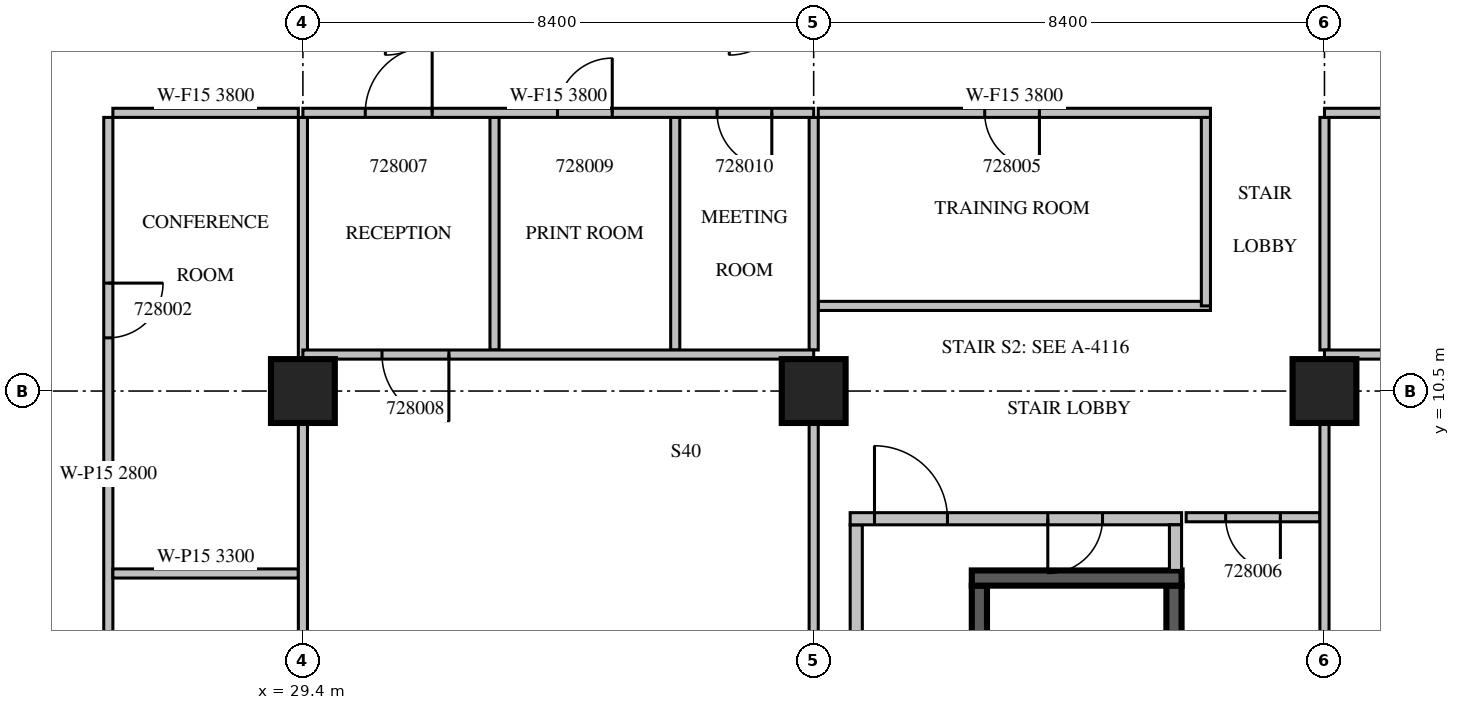
"""IFC4 building model, lengths in metres.
Left out: names, types, materials, properties, quantities, classifications, styles, units other than length and angle.
Written with IfcOpenShell. Run it as: python <this file> out.ifc"""

import sys

from ifc_helpers import new_model, si_unit, direction, frame, frame_2d, origin, origin_2d, place, context, subcontext, project, spatial, rectangle, extrude, source, transform, mapped, element, fill, save


model = new_model("IFC4")
c1 = context("Model", 3, precision=1e-05, world=origin(), true_north=direction((0.0, 1.0)))
c2 = subcontext(c1, "Body", "Model", "MODEL_VIEW")
j1 = project(units=[si_unit("LENGTHUNIT", "METRE"), si_unit("PLANEANGLEUNIT", "RADIAN")], contexts=[c1])
p1 = place(None, origin())
s1 = spatial("IfcSite", under=j1, at=p1, CompositionType="ELEMENT")
p2 = place(p1, origin())
s2 = spatial("IfcBuilding", under=s1, at=p2, CompositionType="ELEMENT")
p3 = place(p2, frame((0.0, 0.0, 128.7)))
s3 = spatial("IfcBuildingStorey", under=s2, at=p3, CompositionType="ELEMENT", Elevation=128.7)
m1 = source(origin(), c2, "Body", "SweptSolid", [
    extrude(rectangle(XDim=1.05, YDim=1.05, at=origin_2d()), origin(), (0.0, 0.0, 1.0), 4.2),
])
for number, where, z_axis, x_axis in (
    (1, (29.4, 10.5, 0.0), (0.0, 0.0, 1.0), (1.0, 0.0, 0.0)),
    (2, (37.8, 10.5, 0.0), (0.0, 0.0, 1.0), (1.0, 0.0, 0.0)),
    (3, (46.2, 10.5, 0.0), (0.0, 0.0, 1.0), (1.0, 0.0, 0.0)),
):
    element("IfcColumn", number, at=place(p3, frame(where, z_axis=z_axis, x_axis=x_axis)), inside=s3, PredefinedType="COLUMN", context=c2, shape_type="MappedRepresentation", body=[
        mapped(m1, transform((0.0, 0.0, 0.0), scale=1.0)),
    ])
m2 = source(origin(), c2, "Body", "SweptSolid", [
    extrude(rectangle(XDim=7.0, YDim=0.25, at=frame_2d((3.5, 0.0))), origin(), (0.0, 0.0, 1.0), 3.8),
])
p4 = place(p3, frame((40.525, 0.3, 0.0), z_axis=(0.0, 0.0, 1.0), x_axis=(0.0, 1.0, 0.0)))
e4 = element("IfcWall", 4, at=p4, inside=s3, PredefinedType="SOLIDWALL", context=c2, shape_type="MappedRepresentation", body=[
    mapped(m2, transform((0.0, 0.0, 0.0), scale=1.0)),
])
m3 = source(origin(), c2, "Body", "SweptSolid", [
    extrude(rectangle(XDim=1.1, YDim=2.1, at=frame_2d((0.55, 1.05))), frame((0.0, 0.135, 0.0), z_axis=(0.0, -1.0, 0.0), x_axis=(1.0, 0.0, 0.0)), (0.0, 0.0, 1.0), 0.27),
])
p5 = place(p4, frame((0.55, 0.0, 0.0)))
e5 = element("IfcOpeningElement", 5, at=p5, cuts=e4, PredefinedType="OPENING", context=c2, shape_type="MappedRepresentation", body=[
    mapped(m3, transform((0.0, 0.0, 0.0), scale=1.0)),
])
p6 = place(p3, frame((43.725, 0.3, 0.0), z_axis=(0.0, 0.0, 1.0), x_axis=(0.0, 1.0, 0.0)))
e6 = element("IfcWall", 6, at=p6, inside=s3, PredefinedType="SOLIDWALL", context=c2, shape_type="MappedRepresentation", body=[
    mapped(m2, transform((0.0, 0.0, 0.0), scale=1.0)),
])
m4 = source(origin(), c2, "Body", "SweptSolid", [
    extrude(rectangle(XDim=3.45, YDim=0.25, at=frame_2d((1.725, 0.0))), origin(), (0.0, 0.0, 1.0), 3.8),
])
p7 = place(p3, frame((40.4, 7.425, 0.0), z_axis=(0.0, 0.0, 1.0), x_axis=(1.0, 0.0, 0.0)))
e7 = element("IfcWall", 7, at=p7, inside=s3, PredefinedType="SOLIDWALL", context=c2, shape_type="MappedRepresentation", body=[
    mapped(m4, transform((0.0, 0.0, 0.0), scale=1.0)),
])
m5 = source(origin(), c2, "Body", "SweptSolid", [
    extrude(rectangle(XDim=8.0, YDim=0.2, at=frame_2d((4.0, 0.0))), origin(), (0.0, 0.0, 1.0), 3.8),
])
p8 = place(p3, frame((38.5, 0.3, 0.0), z_axis=(0.0, 0.0, 1.0), x_axis=(0.0, 1.0, 0.0)))
e8 = element("IfcWall", 8, at=p8, inside=s3, PredefinedType="PARTITIONING", context=c2, shape_type="MappedRepresentation", body=[
    mapped(m5, transform((0.0, 0.0, 0.0), scale=1.0)),
])
m6 = source(origin(), c2, "Body", "SweptSolid", [
    extrude(rectangle(XDim=5.45, YDim=0.2, at=frame_2d((2.725, 0.0))), origin(), (0.0, 0.0, 1.0), 3.8),
])
p9 = place(p3, frame((38.4, 8.4, 0.0), z_axis=(0.0, 0.0, 1.0), x_axis=(1.0, 0.0, 0.0)))
e9 = element("IfcWall", 9, at=p9, inside=s3, PredefinedType="PARTITIONING", context=c2, shape_type="MappedRepresentation", body=[
    mapped(m6, transform((0.0, 0.0, 0.0), scale=1.0)),
])
m7 = source(origin(), c2, "Body", "SweptSolid", [
    extrude(rectangle(XDim=1.2, YDim=2.1, at=frame_2d((0.6, 1.05))), frame((0.0, 0.11, 0.0), z_axis=(0.0, -1.0, 0.0), x_axis=(1.0, 0.0, 0.0)), (0.0, 0.0, 1.0), 0.22),
])
p10 = place(p9, frame((0.4, 0.0, 0.0)))
e10 = element("IfcOpeningElement", 10, at=p10, cuts=e9, PredefinedType="OPENING", context=c2, shape_type="MappedRepresentation", body=[
    mapped(m7, transform((0.0, 0.0, 0.0), scale=1.0)),
])
m8 = source(origin(), c2, "Body", "SweptSolid", [
    extrude(rectangle(XDim=0.9, YDim=2.1, at=frame_2d((0.45, 1.05))), frame((0.0, 0.11, 0.0), z_axis=(0.0, -1.0, 0.0), x_axis=(1.0, 0.0, 0.0)), (0.0, 0.0, 1.0), 0.22),
])
p11 = place(p9, frame((3.25, 0.0, 0.0)))
e11 = element("IfcOpeningElement", 11, at=p11, cuts=e9, PredefinedType="OPENING", context=c2, shape_type="MappedRepresentation", body=[
    mapped(m8, transform((0.0, 0.0, 0.0), scale=1.0)),
])
m9 = source(origin(), c2, "Body", "SweptSolid", [
    extrude(rectangle(XDim=0.75, YDim=0.2, at=frame_2d((0.375, 0.0))), origin(), (0.0, 0.0, 1.0), 3.8),
])
p12 = place(p3, frame((43.75, 7.55, 0.0), z_axis=(0.0, 0.0, 1.0), x_axis=(0.0, 1.0, 0.0)))
e12 = element("IfcWall", 12, at=p12, inside=s3, PredefinedType="PARTITIONING", context=c2, shape_type="MappedRepresentation", body=[
    mapped(m9, transform((0.0, 0.0, 0.0), scale=1.0)),
])
p13 = place(p3, frame((26.2, 15.0, 0.0), z_axis=(0.0, 0.0, 1.0), x_axis=(0.0, -1.0, 0.0)))
e13 = element("IfcWall", 13, at=p13, inside=s3, PredefinedType="PARTITIONING", context=c2, shape_type="SweptSolid", body=[
    extrude(rectangle(XDim=11.725, YDim=0.15, at=frame_2d((5.862, 0.0))), origin(), (0.0, 0.0, 1.0), 2.8),
])
m10 = source(origin(), c2, "Body", "SweptSolid", [
    extrude(rectangle(XDim=0.9, YDim=2.1, at=frame_2d((0.45, 1.05))), frame((0.0, 0.085, 0.0), z_axis=(0.0, -1.0, 0.0), x_axis=(1.0, 0.0, 0.0)), (0.0, 0.0, 1.0), 0.17),
])
p14 = place(p13, frame((9.463, 0.0, 0.0)))
e14 = element("IfcOpeningElement", 14, at=p14, cuts=e13, PredefinedType="OPENING", context=c2, shape_type="MappedRepresentation", body=[
    mapped(m10, transform((0.0, 0.0, 0.0), scale=1.0)),
])
p15 = place(p13, frame((2.725, 0.0, 0.0)))
e15 = element("IfcOpeningElement", 15, at=p15, cuts=e13, PredefinedType="OPENING", context=c2, shape_type="MappedRepresentation", body=[
    mapped(m10, transform((0.0, 0.0, 0.0), scale=1.0)),
])
p16 = place(p3, frame((29.325, 7.5, 0.0), z_axis=(0.0, 0.0, 1.0), x_axis=(-1.0, 0.0, 0.0)))
e16 = element("IfcWall", 16, at=p16, inside=s3, PredefinedType="PARTITIONING", context=c2, shape_type="SweptSolid", body=[
    extrude(rectangle(XDim=3.05, YDim=0.15, at=frame_2d((1.525, 0.0))), origin(), (0.0, 0.0, 1.0), 3.3),
])
m11 = source(origin(), c2, "Body", "SweptSolid", [
    extrude(rectangle(XDim=3.05, YDim=0.15, at=frame_2d((1.525, 0.0))), origin(), (0.0, 0.0, 1.0), 3.8),
])
p17 = place(p3, frame((29.325, 15.075, 0.0), z_axis=(0.0, 0.0, 1.0), x_axis=(-1.0, 0.0, 0.0)))
e17 = element("IfcWall", 17, at=p17, inside=s3, PredefinedType="PARTITIONING", context=c2, shape_type="MappedRepresentation", body=[
    mapped(m11, transform((0.0, 0.0, 0.0), scale=1.0)),
])
m12 = source(origin(), c2, "Body", "SweptSolid", [
    extrude(rectangle(XDim=6.701, YDim=0.15, at=frame_2d((3.35, 0.0))), origin(), (0.0, 0.0, 1.0), 3.8),
])
p18 = place(p3, frame((29.4, 3.275, 0.0), z_axis=(0.0, 0.0, 1.0), x_axis=(0.0, 1.0, 0.0)))
e18 = element("IfcWall", 18, at=p18, inside=s3, PredefinedType="PARTITIONING", context=c2, shape_type="MappedRepresentation", body=[
    mapped(m12, transform((0.0, 0.0, 0.0), scale=1.0)),
])
m13 = source(origin(), c2, "Body", "SweptSolid", [
    extrude(rectangle(XDim=3.976, YDim=0.15, at=frame_2d((1.988, 0.0))), origin(), (0.0, 0.0, 1.0), 3.8),
])
p19 = place(p3, frame((29.4, 11.024, 0.0), z_axis=(0.0, 0.0, 1.0), x_axis=(0.0, 1.0, 0.0)))
e19 = element("IfcWall", 19, at=p19, inside=s3, PredefinedType="PARTITIONING", context=c2, shape_type="MappedRepresentation", body=[
    mapped(m13, transform((0.0, 0.0, 0.0), scale=1.0)),
])
m14 = source(origin(), c2, "Body", "SweptSolid", [
    extrude(rectangle(XDim=6.45, YDim=0.15, at=frame_2d((3.225, 0.0))), origin(), (0.0, 0.0, 1.0), 3.8),
])
p20 = place(p3, frame((37.875, 11.9, 0.0), z_axis=(0.0, 0.0, 1.0), x_axis=(1.0, 0.0, 0.0)))
e20 = element("IfcWall", 20, at=p20, inside=s3, PredefinedType="PARTITIONING", context=c2, shape_type="MappedRepresentation", body=[
    mapped(m14, transform((0.0, 0.0, 0.0), scale=1.0)),
])
m15 = source(origin(), c2, "Body", "SweptSolid", [
    extrude(rectangle(XDim=3.175, YDim=0.15, at=frame_2d((1.587, 0.0))), origin(), (0.0, 0.0, 1.0), 3.8),
])
p21 = place(p3, frame((44.25, 11.9, 0.0), z_axis=(0.0, 0.0, 1.0), x_axis=(0.0, 1.0, 0.0)))
e21 = element("IfcWall", 21, at=p21, inside=s3, PredefinedType="PARTITIONING", context=c2, shape_type="MappedRepresentation", body=[
    mapped(m15, transform((0.0, 0.0, 0.0), scale=1.0)),
])
p22 = place(p3, frame((44.325, 15.075, 0.0), z_axis=(0.0, 0.0, 1.0), x_axis=(-1.0, 0.0, 0.0)))
e22 = element("IfcWall", 22, at=p22, inside=s3, PredefinedType="PARTITIONING", context=c2, shape_type="MappedRepresentation", body=[
    mapped(m14, transform((0.0, 0.0, 0.0), scale=1.0)),
])
p23 = place(p22, frame((2.812, 0.0, 0.0)))
e23 = element("IfcOpeningElement", 23, at=p23, cuts=e22, PredefinedType="OPENING", context=c2, shape_type="MappedRepresentation", body=[
    mapped(m10, transform((0.0, 0.0, 0.0), scale=1.0)),
])
m16 = source(origin(), c2, "Body", "SweptSolid", [
    extrude(rectangle(XDim=2.2, YDim=0.15, at=frame_2d((1.1, 0.0))), origin(), (0.0, 0.0, 1.0), 3.8),
])
p24 = place(p3, frame((46.125, 8.425, 0.0), z_axis=(0.0, 0.0, 1.0), x_axis=(-1.0, 0.0, 0.0)))
e24 = element("IfcWall", 24, at=p24, inside=s3, PredefinedType="PARTITIONING", context=c2, shape_type="MappedRepresentation", body=[
    mapped(m16, transform((0.0, 0.0, 0.0), scale=1.0)),
])
p25 = place(p24, frame((0.65, 0.0, 0.0)))
e25 = element("IfcOpeningElement", 25, at=p25, cuts=e24, PredefinedType="OPENING", context=c2, shape_type="MappedRepresentation", body=[
    mapped(m10, transform((0.0, 0.0, 0.0), scale=1.0)),
])
m17 = source(origin(), c2, "Body", "SweptSolid", [
    extrude(rectangle(XDim=3.825, YDim=0.15, at=frame_2d((1.913, 0.0))), origin(), (0.0, 0.0, 1.0), 3.8),
])
for number, where, z_axis, x_axis in (
    (26, (32.551, 11.175, 0.0), (0.0, 0.0, 1.0), (0.0, 1.0, 0.0)),
    (27, (35.523, 11.175, 0.0), (0.0, 0.0, 1.0), (0.0, 1.0, 0.0)),
):
    element("IfcWall", number, at=place(p3, frame(where, z_axis=z_axis, x_axis=x_axis)), inside=s3, PredefinedType="PARTITIONING", context=c2, shape_type="MappedRepresentation", body=[
        mapped(m17, transform((0.0, 0.0, 0.0), scale=1.0)),
    ])
m18 = source(origin(), c2, "Body", "SweptSolid", [
    extrude(rectangle(XDim=8.927, YDim=0.15, at=frame_2d((4.463, 0.0))), origin(), (0.0, 0.0, 1.0), 3.8),
])
p26 = place(p3, frame((37.8, 1.049, 0.0), z_axis=(0.0, 0.0, 1.0), x_axis=(0.0, 1.0, 0.0)))
e28 = element("IfcWall", 28, at=p26, inside=s3, PredefinedType="PARTITIONING", context=c2, shape_type="MappedRepresentation", body=[
    mapped(m18, transform((0.0, 0.0, 0.0), scale=1.0)),
])
p27 = place(p3, frame((37.8, 11.175, 0.0), z_axis=(0.0, 0.0, 1.0), x_axis=(0.0, 1.0, 0.0)))
e29 = element("IfcWall", 29, at=p27, inside=s3, PredefinedType="PARTITIONING", context=c2, shape_type="MappedRepresentation", body=[
    mapped(m17, transform((0.0, 0.0, 0.0), scale=1.0)),
])
m19 = source(origin(), c2, "Body", "SweptSolid", [
    extrude(rectangle(XDim=8.4, YDim=0.15, at=frame_2d((4.2, 0.0))), origin(), (0.0, 0.0, 1.0), 3.8),
])
p28 = place(p3, frame((37.8, 11.1, 0.0), z_axis=(0.0, 0.0, 1.0), x_axis=(-1.0, 0.0, 0.0)))
e30 = element("IfcWall", 30, at=p28, inside=s3, PredefinedType="PARTITIONING", context=c2, shape_type="MappedRepresentation", body=[
    mapped(m19, transform((0.0, 0.0, 0.0), scale=1.0)),
])
m20 = source(origin(), c2, "Body", "SweptSolid", [
    extrude(rectangle(XDim=1.1, YDim=2.1, at=frame_2d((0.55, 1.05))), frame((0.0, 0.085, 0.0), z_axis=(0.0, -1.0, 0.0), x_axis=(1.0, 0.0, 0.0)), (0.0, 0.0, 1.0), 0.17),
])
p29 = place(p28, frame((5.999, 0.0, 0.0)))
e31 = element("IfcOpeningElement", 31, at=p29, cuts=e30, PredefinedType="OPENING", context=c2, shape_type="MappedRepresentation", body=[
    mapped(m20, transform((0.0, 0.0, 0.0), scale=1.0)),
])
p30 = place(p3, frame((46.2, 1.049, 0.0), z_axis=(0.0, 0.0, 1.0), x_axis=(0.0, 1.0, 0.0)))
e32 = element("IfcWall", 32, at=p30, inside=s3, PredefinedType="PARTITIONING", context=c2, shape_type="MappedRepresentation", body=[
    mapped(m18, transform((0.0, 0.0, 0.0), scale=1.0)),
])
p31 = place(p3, frame((46.2, 11.175, 0.0), z_axis=(0.0, 0.0, 1.0), x_axis=(0.0, 1.0, 0.0)))
e33 = element("IfcWall", 33, at=p31, inside=s3, PredefinedType="PARTITIONING", context=c2, shape_type="MappedRepresentation", body=[
    mapped(m17, transform((0.0, 0.0, 0.0), scale=1.0)),
])
m21 = source(origin(), c2, "Body", "SweptSolid", [
    extrude(rectangle(XDim=24.9, YDim=0.15, at=frame_2d((12.45, 0.0))), origin(), (0.0, 0.0, 1.0), 3.8),
])
p32 = place(p3, frame((71.1, 11.1, 0.0), z_axis=(0.0, 0.0, 1.0), x_axis=(-1.0, 0.0, 0.0)))
e34 = element("IfcWall", 34, at=p32, inside=s3, PredefinedType="PARTITIONING", context=c2, shape_type="MappedRepresentation", body=[
    mapped(m21, transform((0.0, 0.0, 0.0), scale=1.0)),
])
p33 = place(p32, frame((21.51, 0.0, 0.0)))
e35 = element("IfcOpeningElement", 35, at=p33, cuts=e34, PredefinedType="OPENING", context=c2, shape_type="MappedRepresentation", body=[
    mapped(m10, transform((0.0, 0.0, 0.0), scale=1.0)),
])
p34 = place(p32, frame((15.63, 0.0, 0.0)))
e36 = element("IfcOpeningElement", 36, at=p34, cuts=e34, PredefinedType="OPENING", context=c2, shape_type="MappedRepresentation", body=[
    mapped(m10, transform((0.0, 0.0, 0.0), scale=1.0)),
])
p35 = place(p32, frame((9.75, 0.0, 0.0)))
e37 = element("IfcOpeningElement", 37, at=p35, cuts=e34, PredefinedType="OPENING", context=c2, shape_type="MappedRepresentation", body=[
    mapped(m10, transform((0.0, 0.0, 0.0), scale=1.0)),
])
p36 = place(p32, frame((4.645, 0.0, 0.0)))
e38 = element("IfcOpeningElement", 38, at=p36, cuts=e34, PredefinedType="OPENING", context=c2, shape_type="MappedRepresentation", body=[
    mapped(m10, transform((0.0, 0.0, 0.0), scale=1.0)),
])
p37 = place(p32, frame((2.105, 0.0, 0.0)))
e39 = element("IfcOpeningElement", 39, at=p37, cuts=e34, PredefinedType="OPENING", context=c2, shape_type="MappedRepresentation", body=[
    mapped(m20, transform((0.0, 0.0, 0.0), scale=1.0)),
])
p38 = place(p3, frame((37.8, 15.075, 0.0), z_axis=(0.0, 0.0, 1.0), x_axis=(-1.0, 0.0, 0.0)))
e40 = element("IfcWall", 40, at=p38, inside=s3, PredefinedType="PARTITIONING", context=c2, shape_type="MappedRepresentation", body=[
    mapped(m19, transform((0.0, 0.0, 0.0), scale=1.0)),
])
p39 = place(p38, frame((6.274, 0.0, 0.0)))
e41 = element("IfcOpeningElement", 41, at=p39, cuts=e40, PredefinedType="OPENING", context=c2, shape_type="MappedRepresentation", body=[
    mapped(m20, transform((0.0, 0.0, 0.0), scale=1.0)),
])
p40 = place(p38, frame((3.313, 0.0, 0.0)))
e42 = element("IfcOpeningElement", 42, at=p40, cuts=e40, PredefinedType="OPENING", context=c2, shape_type="MappedRepresentation", body=[
    mapped(m10, transform((0.0, 0.0, 0.0), scale=1.0)),
])
p41 = place(p38, frame((0.689, 0.0, 0.0)))
e43 = element("IfcOpeningElement", 43, at=p41, cuts=e40, PredefinedType="OPENING", context=c2, shape_type="MappedRepresentation", body=[
    mapped(m10, transform((0.0, 0.0, 0.0), scale=1.0)),
])
p42 = place(p3, frame((71.1, 15.075, 0.0), z_axis=(0.0, 0.0, 1.0), x_axis=(-1.0, 0.0, 0.0)))
e44 = element("IfcWall", 44, at=p42, inside=s3, PredefinedType="PARTITIONING", context=c2, shape_type="MappedRepresentation", body=[
    mapped(m21, transform((0.0, 0.0, 0.0), scale=1.0)),
])
m22 = source(origin(), c2, "Body", "SweptSolid", [
    extrude(rectangle(XDim=1.2, YDim=2.1, at=frame_2d((0.6, 1.05))), frame((0.0, 0.085, 0.0), z_axis=(0.0, -1.0, 0.0), x_axis=(1.0, 0.0, 0.0)), (0.0, 0.0, 1.0), 0.17),
])
p43 = place(p42, frame((13.59, 0.0, 0.0)))
e45 = element("IfcOpeningElement", 45, at=p43, cuts=e44, PredefinedType="OPENING", context=c2, shape_type="MappedRepresentation", body=[
    mapped(m22, transform((0.0, 0.0, 0.0), scale=1.0)),
])
p44 = place(p42, frame((1.153, 0.0, 0.0)))
e46 = element("IfcOpeningElement", 46, at=p44, cuts=e44, PredefinedType="OPENING", context=c2, shape_type="MappedRepresentation", body=[
    mapped(m20, transform((0.0, 0.0, 0.0), scale=1.0)),
])
m23 = source(origin(), c2, "Body", "SweptSolid", [
    extrude(rectangle(XDim=1.2, YDim=2.1, at=frame_2d((0.6, 1.05))), frame((0.0, 0.025, 0.0), z_axis=(0.0, -1.0, 0.0), x_axis=(1.0, 0.0, 0.0)), (0.0, 0.0, 1.0), 0.05),
])
p45 = place(p10, origin())
e47 = element("IfcDoor", 47, at=p45, inside=s3, OperationType="SINGLE_SWING_LEFT", PredefinedType="DOOR", context=c2, shape_type="MappedRepresentation", body=[
    mapped(m23, transform((0.0, 0.0, 0.0), scale=1.0)),
])
fill(e10, e47)
m24 = source(origin(), c2, "Body", "SweptSolid", [
    extrude(rectangle(XDim=0.9, YDim=2.1, at=frame_2d((0.45, 1.05))), frame((0.0, 0.025, 0.0), z_axis=(0.0, -1.0, 0.0), x_axis=(1.0, 0.0, 0.0)), (0.0, 0.0, 1.0), 0.05),
])
p46 = place(p11, origin())
e48 = element("IfcDoor", 48, at=p46, inside=s3, OperationType="SINGLE_SWING_RIGHT", PredefinedType="DOOR", context=c2, shape_type="MappedRepresentation", body=[
    mapped(m24, transform((0.0, 0.0, 0.0), scale=1.0)),
])
fill(e11, e48)
p47 = place(p15, origin())
e49 = element("IfcDoor", 49, at=p47, inside=s3, OperationType="SINGLE_SWING_LEFT", PredefinedType="DOOR", context=c2, shape_type="MappedRepresentation", body=[
    mapped(m24, transform((0.0, 0.0, 0.0), scale=1.0)),
])
fill(e15, e49)
p48 = place(p23, origin())
e50 = element("IfcDoor", 50, at=p48, inside=s3, OperationType="SINGLE_SWING_LEFT", PredefinedType="DOOR", context=c2, shape_type="MappedRepresentation", body=[
    mapped(m24, transform((0.0, 0.0, 0.0), scale=1.0)),
])
fill(e23, e50)
p49 = place(p25, origin())
e51 = element("IfcDoor", 51, at=p49, inside=s3, OperationType="SINGLE_SWING_LEFT", PredefinedType="DOOR", context=c2, shape_type="MappedRepresentation", body=[
    mapped(m24, transform((0.0, 0.0, 0.0), scale=1.0)),
])
fill(e25, e51)
m25 = source(origin(), c2, "Body", "SweptSolid", [
    extrude(rectangle(XDim=1.1, YDim=2.1, at=frame_2d((0.55, 1.05))), frame((0.0, 0.025, 0.0), z_axis=(0.0, -1.0, 0.0), x_axis=(1.0, 0.0, 0.0)), (0.0, 0.0, 1.0), 0.05),
])
p50 = place(p39, origin())
e52 = element("IfcDoor", 52, at=p50, inside=s3, OperationType="SINGLE_SWING_RIGHT", PredefinedType="DOOR", context=c2, shape_type="MappedRepresentation", body=[
    mapped(m25, transform((0.0, 0.0, 0.0), scale=1.0)),
])
fill(e41, e52)
p51 = place(p29, origin())
e53 = element("IfcDoor", 53, at=p51, inside=s3, OperationType="SINGLE_SWING_LEFT", PredefinedType="DOOR", context=c2, shape_type="MappedRepresentation", body=[
    mapped(m25, transform((0.0, 0.0, 0.0), scale=1.0)),
])
fill(e31, e53)
p52 = place(p40, origin())
e54 = element("IfcDoor", 54, at=p52, inside=s3, OperationType="SINGLE_SWING_RIGHT", PredefinedType="DOOR", context=c2, shape_type="MappedRepresentation", body=[
    mapped(m24, transform((0.0, 0.0, 0.0), scale=1.0)),
])
fill(e42, e54)
p53 = place(p41, origin())
e55 = element("IfcDoor", 55, at=p53, inside=s3, OperationType="SINGLE_SWING_LEFT", PredefinedType="DOOR", context=c2, shape_type="MappedRepresentation", body=[
    mapped(m24, transform((0.0, 0.0, 0.0), scale=1.0)),
])
fill(e43, e55)
save(model, sys.argv[1])
